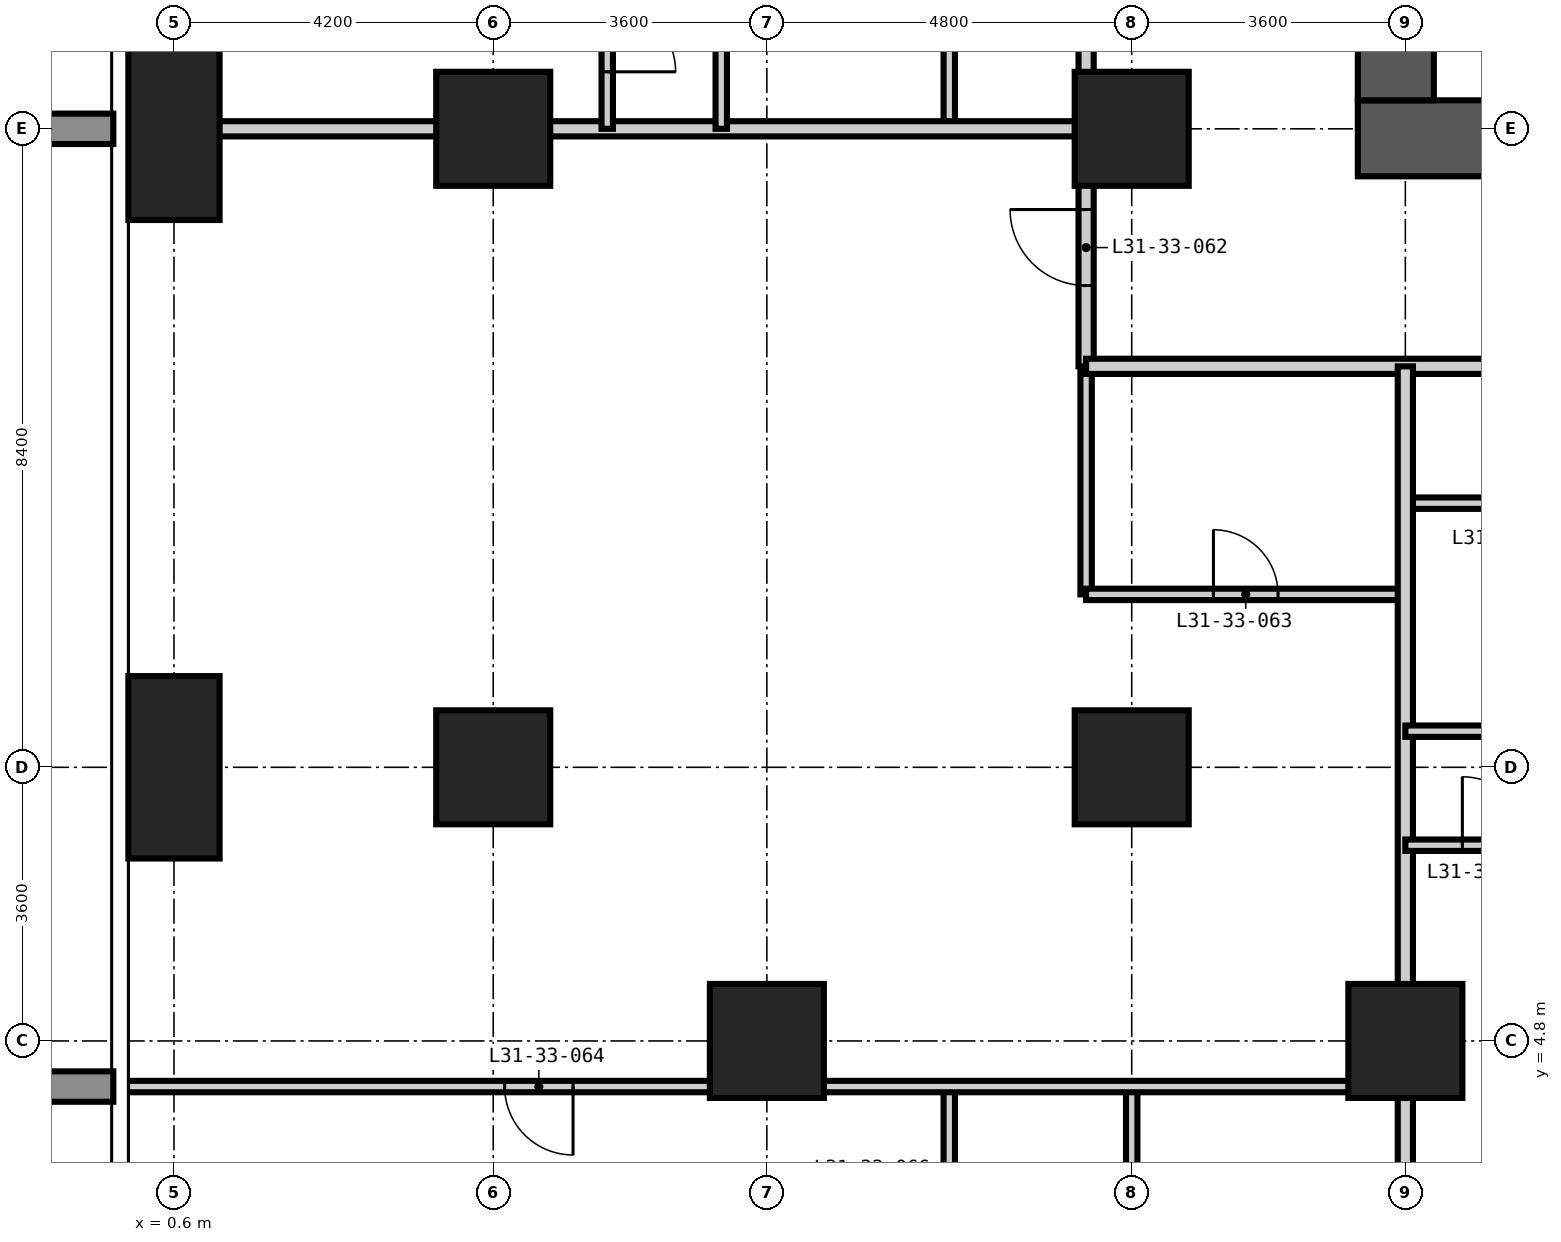
"""IFC4 building model, lengths in metres.
Left out: names, types, materials, properties, quantities, classifications, styles, units other than length and angle.
Written with IfcOpenShell. Run it as: python <this file> out.ifc"""

import sys

from ifc_helpers import new_model, si_unit, direction, frame, frame_2d, origin, origin_2d, place, context, subcontext, project, spatial, rectangle, extrude, element, fill, save


model = new_model("IFC4")
c1 = context("Model", 3, precision=1e-05, world=origin(), true_north=direction((0.0, 1.0)))
c2 = subcontext(c1, "Body", "Model", "MODEL_VIEW")
j1 = project(units=[si_unit("LENGTHUNIT", "METRE"), si_unit("PLANEANGLEUNIT", "RADIAN")], contexts=[c1])
p1 = place(None, origin())
s1 = spatial("IfcSite", under=j1, at=p1, CompositionType="ELEMENT")
p2 = place(p1, origin())
s2 = spatial("IfcBuilding", under=s1, at=p2, CompositionType="ELEMENT")
p3 = place(p2, frame((0.0, 0.0, 122.4)))
s3 = spatial("IfcBuildingStorey", under=s2, at=p3, CompositionType="ELEMENT", Elevation=122.4)
for number, where, z_axis, x_axis in (
    (1, (0.6, 8.4, -0.35), (0.0, 0.0, 1.0), (1.0, 0.0, 0.0)),
    (2, (0.6, 16.8, -0.35), (0.0, 0.0, 1.0), (1.0, 0.0, 0.0)),
):
    element("IfcColumn", number, at=place(p3, frame(where, z_axis=z_axis, x_axis=x_axis)), inside=s3, PredefinedType="COLUMN", context=c2, shape_type="SweptSolid", body=[
        extrude(rectangle(XDim=1.2, YDim=2.4, at=origin_2d()), origin(), (0.0, 0.0, 1.0), 3.6),
    ])
for number, where, z_axis, x_axis in (
    (3, (4.8, 8.4, -0.35), (0.0, 0.0, 1.0), (1.0, 0.0, 0.0)),
    (4, (4.8, 16.8, -0.35), (0.0, 0.0, 1.0), (1.0, 0.0, 0.0)),
    (5, (8.4, 4.8, -0.35), (0.0, 0.0, 1.0), (1.0, 0.0, 0.0)),
    (6, (13.2, 8.4, -0.35), (0.0, 0.0, 1.0), (1.0, 0.0, 0.0)),
    (7, (13.2, 16.8, -0.35), (0.0, 0.0, 1.0), (1.0, 0.0, 0.0)),
    (8, (16.8, 4.8, -0.35), (0.0, 0.0, 1.0), (1.0, 0.0, 0.0)),
):
    element("IfcColumn", number, at=place(p3, frame(where, z_axis=z_axis, x_axis=x_axis)), inside=s3, PredefinedType="COLUMN", context=c2, shape_type="SweptSolid", body=[
        extrude(rectangle(XDim=1.5, YDim=1.5, at=origin_2d()), origin(), (0.0, 0.0, 1.0), 3.6),
    ])
p4 = place(p3, frame((16.175, 16.675, -0.35), z_axis=(0.0, 0.0, 1.0), x_axis=(1.0, 0.0, 0.0)))
e9 = element("IfcWall", 9, at=p4, inside=s3, PredefinedType="SHEAR", context=c2, shape_type="SweptSolid", body=[
    extrude(rectangle(XDim=26.45, YDim=1.0, at=frame_2d((13.225, 0.0))), origin(), (0.0, 0.0, 1.0), 3.6),
])
p5 = place(p4, frame((12.725, 0.0, 0.35)))
e10 = element("IfcOpeningElement", 10, at=p5, cuts=e9, PredefinedType="OPENING", context=c2, shape_type="SweptSolid", body=[
    extrude(rectangle(XDim=1.0, YDim=2.1, at=frame_2d((0.5, 1.05))), frame((0.0, 0.51, 0.0), z_axis=(0.0, -1.0, 0.0), x_axis=(1.0, 0.0, 0.0)), (0.0, 0.0, 1.0), 1.02),
])
p6 = place(p4, frame((19.025, 0.0, 0.35)))
e11 = element("IfcOpeningElement", 11, at=p6, cuts=e9, PredefinedType="OPENING", context=c2, shape_type="SweptSolid", body=[
    extrude(rectangle(XDim=1.0, YDim=2.1, at=frame_2d((0.5, 1.05))), frame((0.0, 0.51, 0.0), z_axis=(0.0, -1.0, 0.0), x_axis=(1.0, 0.0, 0.0)), (0.0, 0.0, 1.0), 1.02),
])
p7 = place(p3, frame((16.675, 41.625, -0.35), z_axis=(0.0, 0.0, 1.0), x_axis=(0.0, -1.0, 0.0)))
e12 = element("IfcWall", 12, at=p7, inside=s3, PredefinedType="SHEAR", context=c2, shape_type="SweptSolid", body=[
    extrude(rectangle(XDim=24.45, YDim=1.0, at=frame_2d((12.225, 0.0))), origin(), (0.0, 0.0, 1.0), 3.6),
])
p8 = place(p7, frame((11.325, 0.0, 0.35)))
e13 = element("IfcOpeningElement", 13, at=p8, cuts=e12, PredefinedType="OPENING", context=c2, shape_type="SweptSolid", body=[
    extrude(rectangle(XDim=1.8, YDim=2.2, at=frame_2d((0.9, 1.1))), frame((0.0, 0.51, 0.0), z_axis=(0.0, -1.0, 0.0), x_axis=(1.0, 0.0, 0.0)), (0.0, 0.0, 1.0), 1.02),
])
p9 = place(p7, frame((20.125, 0.0, 0.35)))
e14 = element("IfcOpeningElement", 14, at=p9, cuts=e12, PredefinedType="OPENING", context=c2, shape_type="SweptSolid", body=[
    extrude(rectangle(XDim=1.0, YDim=2.1, at=frame_2d((0.5, 1.05))), frame((0.0, 0.51, 0.0), z_axis=(0.0, -1.0, 0.0), x_axis=(1.0, 0.0, 0.0)), (0.0, 0.0, 1.0), 1.02),
])
p10 = place(p7, frame((5.425, 0.0, 0.35)))
e15 = element("IfcOpeningElement", 15, at=p10, cuts=e12, PredefinedType="OPENING", context=c2, shape_type="SweptSolid", body=[
    extrude(rectangle(XDim=1.0, YDim=2.1, at=frame_2d((0.5, 1.05))), frame((0.0, 0.51, 0.0), z_axis=(0.0, -1.0, 0.0), x_axis=(1.0, 0.0, 0.0)), (0.0, 0.0, 1.0), 1.02),
])
p11 = place(p3, frame((10.8, 16.8, 0.0), z_axis=(0.0, 0.0, 1.0), x_axis=(0.0, 1.0, 0.0)))
e16 = element("IfcWall", 16, at=p11, inside=s3, PredefinedType="PARTITIONING", context=c2, shape_type="SweptSolid", body=[
    extrude(rectangle(XDim=2.4, YDim=0.15, at=frame_2d((1.2, 0.0))), origin(), (0.0, 0.0, 1.0), 3.25),
])
p12 = place(p3, frame((12.6, 10.675, 0.0), z_axis=(0.0, 0.0, 1.0), x_axis=(0.0, 1.0, 0.0)))
e17 = element("IfcWall", 17, at=p12, inside=s3, PredefinedType="PARTITIONING", context=c2, shape_type="SweptSolid", body=[
    extrude(rectangle(XDim=3.0, YDim=0.15, at=frame_2d((1.5, 0.0))), origin(), (0.0, 0.0, 1.0), 3.25),
])
p13 = place(p3, frame((12.6, 10.675, 0.0), z_axis=(0.0, 0.0, 1.0), x_axis=(1.0, 0.0, 0.0)))
e18 = element("IfcWall", 18, at=p13, inside=s3, PredefinedType="PARTITIONING", context=c2, shape_type="SweptSolid", body=[
    extrude(rectangle(XDim=4.2, YDim=0.15, at=frame_2d((2.1, 0.0))), origin(), (0.0, 0.0, 1.0), 3.25),
])
p14 = place(p13, frame((1.675, 0.0, 0.0)))
e19 = element("IfcOpeningElement", 19, at=p14, cuts=e18, PredefinedType="OPENING", context=c2, shape_type="SweptSolid", body=[
    extrude(rectangle(XDim=0.85, YDim=2.1, at=frame_2d((0.425, 1.05))), frame((0.0, 0.085, 0.0), z_axis=(0.0, -1.0, 0.0), x_axis=(1.0, 0.0, 0.0)), (0.0, 0.0, 1.0), 0.17),
])
p15 = place(p3, frame((16.8, 11.875, 0.0), z_axis=(0.0, 0.0, 1.0), x_axis=(1.0, 0.0, 0.0)))
e20 = element("IfcWall", 20, at=p15, inside=s3, PredefinedType="PARTITIONING", context=c2, shape_type="SweptSolid", body=[
    extrude(rectangle(XDim=2.4, YDim=0.15, at=frame_2d((1.2, 0.0))), origin(), (0.0, 0.0, 1.0), 3.25),
])
p16 = place(p3, frame((12.6, 13.675, 0.0), z_axis=(0.0, 0.0, 1.0), x_axis=(0.0, 1.0, 0.0)))
e21 = element("IfcWall", 21, at=p16, inside=s3, PredefinedType="PARTITIONING", context=c2, shape_type="SweptSolid", body=[
    extrude(rectangle(XDim=32.05, YDim=0.2, at=frame_2d((16.025, 0.0))), origin(), (0.0, 0.0, 1.0), 3.25),
])
p17 = place(p16, frame((6.825, 0.0, 0.0)))
e22 = element("IfcOpeningElement", 22, at=p17, cuts=e21, PredefinedType="OPENING", context=c2, shape_type="SweptSolid", body=[
    extrude(rectangle(XDim=1.0, YDim=2.2, at=frame_2d((0.5, 1.1))), frame((0.0, 0.11, 0.0), z_axis=(0.0, -1.0, 0.0), x_axis=(1.0, 0.0, 0.0)), (0.0, 0.0, 1.0), 0.22),
])
p18 = place(p16, frame((15.225, 0.0, 0.0)))
e23 = element("IfcOpeningElement", 23, at=p18, cuts=e21, PredefinedType="OPENING", context=c2, shape_type="SweptSolid", body=[
    extrude(rectangle(XDim=1.0, YDim=2.2, at=frame_2d((0.5, 1.1))), frame((0.0, 0.11, 0.0), z_axis=(0.0, -1.0, 0.0), x_axis=(1.0, 0.0, 0.0)), (0.0, 0.0, 1.0), 0.22),
])
p19 = place(p16, frame((23.625, 0.0, 0.0)))
e24 = element("IfcOpeningElement", 24, at=p19, cuts=e21, PredefinedType="OPENING", context=c2, shape_type="SweptSolid", body=[
    extrude(rectangle(XDim=1.0, YDim=2.2, at=frame_2d((0.5, 1.1))), frame((0.0, 0.11, 0.0), z_axis=(0.0, -1.0, 0.0), x_axis=(1.0, 0.0, 0.0)), (0.0, 0.0, 1.0), 0.22),
])
p20 = place(p16, frame((1.063, 0.0, 0.0)))
e25 = element("IfcOpeningElement", 25, at=p20, cuts=e21, PredefinedType="OPENING", context=c2, shape_type="SweptSolid", body=[
    extrude(rectangle(XDim=1.0, YDim=2.2, at=frame_2d((0.5, 1.1))), frame((0.0, 0.11, 0.0), z_axis=(0.0, -1.0, 0.0), x_axis=(1.0, 0.0, 0.0)), (0.0, 0.0, 1.0), 0.22),
])
p21 = place(p16, frame((29.687, 0.0, 0.0)))
e26 = element("IfcOpeningElement", 26, at=p21, cuts=e21, PredefinedType="OPENING", context=c2, shape_type="SweptSolid", body=[
    extrude(rectangle(XDim=1.0, YDim=2.2, at=frame_2d((0.5, 1.1))), frame((0.0, 0.11, 0.0), z_axis=(0.0, -1.0, 0.0), x_axis=(1.0, 0.0, 0.0)), (0.0, 0.0, 1.0), 0.22),
])
p22 = place(p3, frame((44.525, 13.675, 0.0), z_axis=(0.0, 0.0, 1.0), x_axis=(-1.0, 0.0, 0.0)))
e27 = element("IfcWall", 27, at=p22, inside=s3, PredefinedType="PARTITIONING", context=c2, shape_type="SweptSolid", body=[
    extrude(rectangle(XDim=31.925, YDim=0.2, at=frame_2d((15.962, 0.0))), origin(), (0.0, 0.0, 1.0), 3.25),
])
p23 = place(p22, frame((25.125, 0.0, 0.0)))
e28 = element("IfcOpeningElement", 28, at=p23, cuts=e27, PredefinedType="OPENING", context=c2, shape_type="SweptSolid", body=[
    extrude(rectangle(XDim=1.0, YDim=2.2, at=frame_2d((0.5, 1.1))), frame((0.0, 0.11, 0.0), z_axis=(0.0, -1.0, 0.0), x_axis=(1.0, 0.0, 0.0)), (0.0, 0.0, 1.0), 0.22),
])
p24 = place(p22, frame((18.825, 0.0, 0.0)))
e29 = element("IfcOpeningElement", 29, at=p24, cuts=e27, PredefinedType="OPENING", context=c2, shape_type="SweptSolid", body=[
    extrude(rectangle(XDim=1.0, YDim=2.2, at=frame_2d((0.5, 1.1))), frame((0.0, 0.11, 0.0), z_axis=(0.0, -1.0, 0.0), x_axis=(1.0, 0.0, 0.0)), (0.0, 0.0, 1.0), 0.22),
])
p25 = place(p22, frame((10.425, 0.0, 0.0)))
e30 = element("IfcOpeningElement", 30, at=p25, cuts=e27, PredefinedType="OPENING", context=c2, shape_type="SweptSolid", body=[
    extrude(rectangle(XDim=1.0, YDim=2.2, at=frame_2d((0.5, 1.1))), frame((0.0, 0.11, 0.0), z_axis=(0.0, -1.0, 0.0), x_axis=(1.0, 0.0, 0.0)), (0.0, 0.0, 1.0), 0.22),
])
p26 = place(p22, frame((4.125, 0.0, 0.0)))
e31 = element("IfcOpeningElement", 31, at=p26, cuts=e27, PredefinedType="OPENING", context=c2, shape_type="SweptSolid", body=[
    extrude(rectangle(XDim=1.0, YDim=2.2, at=frame_2d((0.5, 1.1))), frame((0.0, 0.11, 0.0), z_axis=(0.0, -1.0, 0.0), x_axis=(1.0, 0.0, 0.0)), (0.0, 0.0, 1.0), 0.22),
])
p27 = place(p3, frame((16.8, -0.018, 0.0), z_axis=(0.0, 0.0, 1.0), x_axis=(0.0, 1.0, 0.0)))
e32 = element("IfcWall", 32, at=p27, inside=s3, PredefinedType="PARTITIONING", context=c2, shape_type="SweptSolid", body=[
    extrude(rectangle(XDim=13.693, YDim=0.2, at=frame_2d((6.847, 0.0))), origin(), (0.0, 0.0, 1.0), 3.25),
])
p28 = place(p3, frame((-0.018, 16.8, 0.0), z_axis=(0.0, 0.0, 1.0), x_axis=(1.0, 0.0, 0.0)))
e33 = element("IfcWall", 33, at=p28, inside=s3, PredefinedType="PARTITIONING", context=c2, shape_type="SweptSolid", body=[
    extrude(rectangle(XDim=12.618, YDim=0.2, at=frame_2d((6.309, 0.0))), origin(), (0.0, 0.0, 1.0), 3.25),
])
p29 = place(p3, frame((6.3, 16.8, 0.0), z_axis=(0.0, 0.0, 1.0), x_axis=(0.0, 1.0, 0.0)))
e34 = element("IfcWall", 34, at=p29, inside=s3, PredefinedType="PARTITIONING", context=c2, shape_type="SweptSolid", body=[
    extrude(rectangle(XDim=2.4, YDim=0.15, at=frame_2d((1.2, 0.0))), origin(), (0.0, 0.0, 1.0), 3.25),
])
p30 = place(p29, frame((0.75, 0.0, 0.0)))
e35 = element("IfcOpeningElement", 35, at=p30, cuts=e34, PredefinedType="OPENING", context=c2, shape_type="SweptSolid", body=[
    extrude(rectangle(XDim=0.9, YDim=2.1, at=frame_2d((0.45, 1.05))), frame((0.0, 0.085, 0.0), z_axis=(0.0, -1.0, 0.0), x_axis=(1.0, 0.0, 0.0)), (0.0, 0.0, 1.0), 0.17),
])
p31 = place(p3, frame((7.8, 16.8, 0.0), z_axis=(0.0, 0.0, 1.0), x_axis=(0.0, 1.0, 0.0)))
e36 = element("IfcWall", 36, at=p31, inside=s3, PredefinedType="PARTITIONING", context=c2, shape_type="SweptSolid", body=[
    extrude(rectangle(XDim=2.4, YDim=0.15, at=frame_2d((1.2, 0.0))), origin(), (0.0, 0.0, 1.0), 3.25),
])
p32 = place(p3, frame((10.8, 1.2, 0.0), z_axis=(0.0, 0.0, 1.0), x_axis=(0.0, 1.0, 0.0)))
e37 = element("IfcWall", 37, at=p32, inside=s3, PredefinedType="PARTITIONING", context=c2, shape_type="SweptSolid", body=[
    extrude(rectangle(XDim=3.0, YDim=0.15, at=frame_2d((1.5, 0.0))), origin(), (0.0, 0.0, 1.0), 3.25),
])
p33 = place(p32, frame((1.05, 0.0, 0.0)))
e38 = element("IfcOpeningElement", 38, at=p33, cuts=e37, PredefinedType="OPENING", context=c2, shape_type="SweptSolid", body=[
    extrude(rectangle(XDim=0.9, YDim=2.1, at=frame_2d((0.45, 1.05))), frame((0.0, 0.085, 0.0), z_axis=(0.0, -1.0, 0.0), x_axis=(1.0, 0.0, 0.0)), (0.0, 0.0, 1.0), 0.17),
])
p34 = place(p3, frame((13.2, 1.2, 0.0), z_axis=(0.0, 0.0, 1.0), x_axis=(0.0, 1.0, 0.0)))
e39 = element("IfcWall", 39, at=p34, inside=s3, PredefinedType="PARTITIONING", context=c2, shape_type="SweptSolid", body=[
    extrude(rectangle(XDim=3.0, YDim=0.15, at=frame_2d((1.5, 0.0))), origin(), (0.0, 0.0, 1.0), 3.25),
])
p35 = place(p3, frame((-0.018, 4.2, 0.0), z_axis=(0.0, 0.0, 1.0), x_axis=(1.0, 0.0, 0.0)))
e40 = element("IfcWall", 40, at=p35, inside=s3, PredefinedType="PARTITIONING", context=c2, shape_type="SweptSolid", body=[
    extrude(rectangle(XDim=16.818, YDim=0.15, at=frame_2d((8.409, 0.0))), origin(), (0.0, 0.0, 1.0), 3.25),
])
p36 = place(p35, frame((4.968, 0.0, 0.0)))
e41 = element("IfcOpeningElement", 41, at=p36, cuts=e40, PredefinedType="OPENING", context=c2, shape_type="SweptSolid", body=[
    extrude(rectangle(XDim=0.9, YDim=2.1, at=frame_2d((0.45, 1.05))), frame((0.0, 0.085, 0.0), z_axis=(0.0, -1.0, 0.0), x_axis=(1.0, 0.0, 0.0)), (0.0, 0.0, 1.0), 0.17),
])
p37 = place(p3, frame((16.8, 7.375, 0.0), z_axis=(0.0, 0.0, 1.0), x_axis=(1.0, 0.0, 0.0)))
e42 = element("IfcWall", 42, at=p37, inside=s3, PredefinedType="PARTITIONING", context=c2, shape_type="SweptSolid", body=[
    extrude(rectangle(XDim=2.4, YDim=0.15, at=frame_2d((1.2, 0.0))), origin(), (0.0, 0.0, 1.0), 3.25),
])
p38 = place(p37, frame((0.75, 0.0, 0.0)))
e43 = element("IfcOpeningElement", 43, at=p38, cuts=e42, PredefinedType="OPENING", context=c2, shape_type="SweptSolid", body=[
    extrude(rectangle(XDim=0.9, YDim=2.1, at=frame_2d((0.45, 1.05))), frame((0.0, 0.085, 0.0), z_axis=(0.0, -1.0, 0.0), x_axis=(1.0, 0.0, 0.0)), (0.0, 0.0, 1.0), 0.17),
])
p39 = place(p3, frame((16.8, 8.875, 0.0), z_axis=(0.0, 0.0, 1.0), x_axis=(1.0, 0.0, 0.0)))
e44 = element("IfcWall", 44, at=p39, inside=s3, PredefinedType="PARTITIONING", context=c2, shape_type="SweptSolid", body=[
    extrude(rectangle(XDim=2.4, YDim=0.15, at=frame_2d((1.2, 0.0))), origin(), (0.0, 0.0, 1.0), 3.25),
])
p40 = place(p38, origin())
e45 = element("IfcDoor", 45, at=p40, inside=s3, OperationType="SINGLE_SWING_LEFT", PredefinedType="DOOR", context=c2, shape_type="SweptSolid", body=[
    extrude(rectangle(XDim=0.9, YDim=2.1, at=frame_2d((0.45, 1.05))), frame((0.0, 0.025, 0.0), z_axis=(0.0, -1.0, 0.0), x_axis=(1.0, 0.0, 0.0)), (0.0, 0.0, 1.0), 0.05),
])
fill(e43, e45)
p41 = place(p30, frame((0.9, 0.0, 0.0), z_axis=(0.0, 0.0, 1.0), x_axis=(-1.0, 0.0, 0.0)))
e46 = element("IfcDoor", 46, at=p41, inside=s3, OperationType="SINGLE_SWING_RIGHT", PredefinedType="DOOR", context=c2, shape_type="SweptSolid", body=[
    extrude(rectangle(XDim=0.9, YDim=2.1, at=frame_2d((0.45, 1.05))), frame((0.0, 0.025, 0.0), z_axis=(0.0, -1.0, 0.0), x_axis=(1.0, 0.0, 0.0)), (0.0, 0.0, 1.0), 0.05),
])
fill(e35, e46)
p42 = place(p20, origin())
e47 = element("IfcDoor", 47, at=p42, inside=s3, OperationType="SINGLE_SWING_RIGHT", PredefinedType="DOOR", context=c2, shape_type="SweptSolid", body=[
    extrude(rectangle(XDim=1.0, YDim=2.2, at=frame_2d((0.5, 1.1))), frame((0.0, 0.025, 0.0), z_axis=(0.0, -1.0, 0.0), x_axis=(1.0, 0.0, 0.0)), (0.0, 0.0, 1.0), 0.05),
])
fill(e25, e47)
p43 = place(p14, origin())
e48 = element("IfcDoor", 48, at=p43, inside=s3, OperationType="SINGLE_SWING_LEFT", PredefinedType="DOOR", context=c2, shape_type="SweptSolid", body=[
    extrude(rectangle(XDim=0.85, YDim=2.1, at=frame_2d((0.425, 1.05))), frame((0.0, 0.025, 0.0), z_axis=(0.0, -1.0, 0.0), x_axis=(1.0, 0.0, 0.0)), (0.0, 0.0, 1.0), 0.05),
])
fill(e19, e48)
p44 = place(p36, frame((0.9, 0.0, 0.0), z_axis=(0.0, 0.0, 1.0), x_axis=(-1.0, 0.0, 0.0)))
e49 = element("IfcDoor", 49, at=p44, inside=s3, OperationType="SINGLE_SWING_LEFT", PredefinedType="DOOR", context=c2, shape_type="SweptSolid", body=[
    extrude(rectangle(XDim=0.9, YDim=2.1, at=frame_2d((0.45, 1.05))), frame((0.0, 0.025, 0.0), z_axis=(0.0, -1.0, 0.0), x_axis=(1.0, 0.0, 0.0)), (0.0, 0.0, 1.0), 0.05),
])
fill(e41, e49)
save(model, sys.argv[1])
